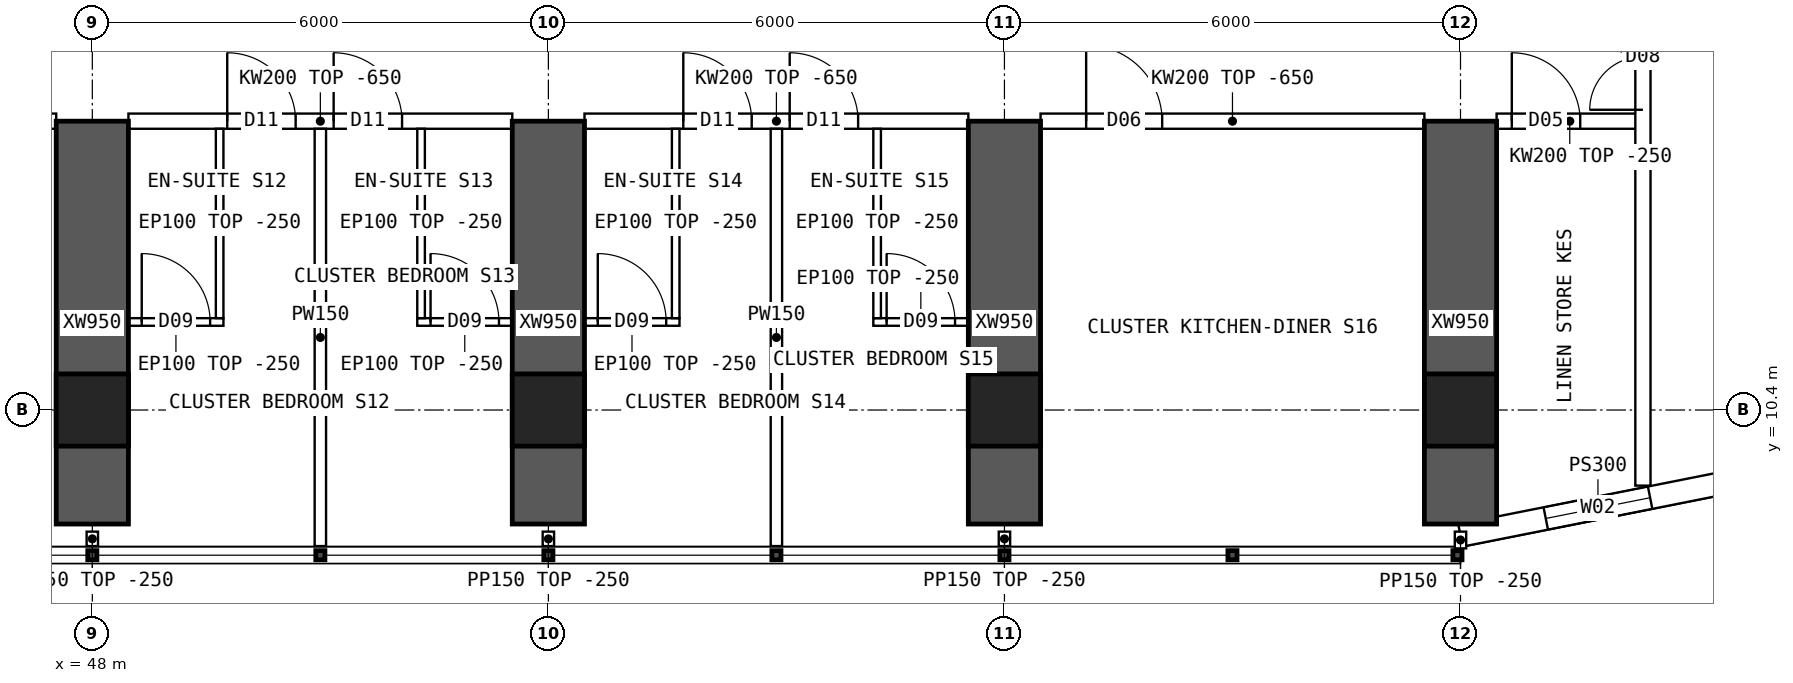
"""IFC4 building model, lengths in metres.
Left out: names, types, materials, properties, quantities, classifications, styles, units other than length and angle.
Written with IfcOpenShell. Run it as: python <this file> out.ifc"""

import sys

from ifc_helpers import new_model, si_unit, direction, frame, frame_2d, origin, origin_2d, place, context, subcontext, project, spatial, polyline, rectangle, hollow_rectangle, outline, extrude, element, fill, save


model = new_model("IFC4")
c1 = context("Model", 3, precision=1e-05, world=origin(), true_north=direction((0.0, 1.0)))
c2 = subcontext(c1, "Body", "Model", "MODEL_VIEW")
j1 = project(units=[si_unit("LENGTHUNIT", "METRE"), si_unit("PLANEANGLEUNIT", "RADIAN")], contexts=[c1])
p1 = place(None, origin())
s1 = spatial("IfcSite", under=j1, at=p1, CompositionType="ELEMENT")
p2 = place(p1, origin())
s2 = spatial("IfcBuilding", under=s1, at=p2, CompositionType="ELEMENT")
p3 = place(p2, frame((0.0, 0.0, 125.65)))
s3 = spatial("IfcBuildingStorey", under=s2, at=p3, CompositionType="ELEMENT", Elevation=125.65)
for number, where, z_axis, x_axis in (
    (1, (48.0, 10.4, 0.0), (0.0, 0.0, 1.0), (1.0, 0.0, 0.0)),
    (2, (54.0, 10.4, 0.0), (0.0, 0.0, 1.0), (1.0, 0.0, 0.0)),
    (3, (60.0, 10.4, 0.0), (0.0, 0.0, 1.0), (1.0, 0.0, 0.0)),
    (4, (66.0, 10.4, 0.0), (0.0, 0.0, 1.0), (1.0, 0.0, 0.0)),
):
    element("IfcColumn", number, at=place(p3, frame(where, z_axis=z_axis, x_axis=x_axis)), inside=s3, PredefinedType="COLUMN", context=c2, shape_type="SweptSolid", body=[
        extrude(hollow_rectangle(XDim=0.95, YDim=0.95, WallThickness=0.095, at=origin_2d()), origin(), (0.0, 0.0, 1.0), 3.75),
    ])
for number, where, z_axis, x_axis in (
    (5, (48.0, 8.9, 0.0), (0.0, 0.0, 1.0), (0.0, 1.0, 0.0)),
    (6, (54.0, 8.9, 0.0), (0.0, 0.0, 1.0), (0.0, 1.0, 0.0)),
    (7, (60.0, 8.9, 0.0), (0.0, 0.0, 1.0), (0.0, 1.0, 0.0)),
    (8, (66.0, 8.9, 0.0), (0.0, 0.0, 1.0), (0.0, 1.0, 0.0)),
):
    element("IfcWall", number, at=place(p3, frame(where, z_axis=z_axis, x_axis=x_axis)), inside=s3, PredefinedType="SHEAR", context=c2, shape_type="SweptSolid", body=[
        extrude(rectangle(XDim=5.3, YDim=0.95, at=frame_2d((2.65, 0.0))), origin(), (0.0, 0.0, 1.0), 3.75),
    ])
p4 = place(p3, frame((66.0, 8.75, 0.0), z_axis=(0.0, 0.0, 1.0), x_axis=(0.980791473772, 0.195059183267, 0.0)))
e9 = element("IfcWall", 9, at=p4, inside=s3, PredefinedType="SOLIDWALL", context=c2, shape_type="SweptSolid", body=[
    extrude(outline(polyline([(-0.03, -0.15), (3.717, -0.15), (3.657, 0.15), (0.03, 0.15), (-0.03, -0.15)])), origin(), (0.0, 0.0, 1.0), 3.5),
])
p5 = place(p4, frame((1.144, 0.0, 0.9)))
e10 = element("IfcOpeningElement", 10, at=p5, cuts=e9, PredefinedType="OPENING", context=c2, shape_type="SweptSolid", body=[
    extrude(rectangle(XDim=1.4, YDim=1.8, at=frame_2d((0.7, 0.9))), frame((0.0, 0.16, 0.0), z_axis=(0.0, -1.0, 0.0), x_axis=(1.0, 0.0, 0.0)), (0.0, 0.0, 1.0), 0.32),
])
p6 = place(p3, frame((42.475, 14.2, 0.0), z_axis=(0.0, 0.0, 1.0), x_axis=(1.0, 0.0, 0.0)))
e11 = element("IfcWall", 11, at=p6, inside=s3, PredefinedType="SOLIDWALL", context=c2, shape_type="SweptSolid", body=[
    extrude(outline(polyline([(0.0, 0.0), (5.05, 0.0), (5.05, 3.1), (0.0, 3.1), (0.0, 0.0)])), frame((0.0, 0.1, 0.0), z_axis=(0.0, -1.0, 0.0), x_axis=(1.0, 0.0, 0.0)), (0.0, 0.0, 1.0), 0.2),
])
p7 = place(p6, frame((0.6, 0.0, 0.0)))
e12 = element("IfcOpeningElement", 12, at=p7, cuts=e11, PredefinedType="OPENING", context=c2, shape_type="SweptSolid", body=[
    extrude(rectangle(XDim=1.0, YDim=2.1, at=frame_2d((0.5, 1.05))), frame((0.0, 0.11, 0.0), z_axis=(0.0, -1.0, 0.0), x_axis=(1.0, 0.0, 0.0)), (0.0, 0.0, 1.0), 0.22),
])
p8 = place(p3, frame((48.475, 14.2, 0.0), z_axis=(0.0, 0.0, 1.0), x_axis=(1.0, 0.0, 0.0)))
e13 = element("IfcWall", 13, at=p8, inside=s3, PredefinedType="SOLIDWALL", context=c2, shape_type="SweptSolid", body=[
    extrude(outline(polyline([(0.0, 0.0), (5.05, 0.0), (5.05, 3.1), (0.0, 3.1), (0.0, 0.0)])), frame((0.0, 0.1, 0.0), z_axis=(0.0, -1.0, 0.0), x_axis=(1.0, 0.0, 0.0)), (0.0, 0.0, 1.0), 0.2),
])
p9 = place(p8, frame((1.3, 0.0, 0.0)))
e14 = element("IfcOpeningElement", 14, at=p9, cuts=e13, PredefinedType="OPENING", context=c2, shape_type="SweptSolid", body=[
    extrude(rectangle(XDim=0.9, YDim=2.1, at=frame_2d((0.45, 1.05))), frame((0.0, 0.11, 0.0), z_axis=(0.0, -1.0, 0.0), x_axis=(1.0, 0.0, 0.0)), (0.0, 0.0, 1.0), 0.22),
])
p10 = place(p8, frame((2.7, 0.0, 0.0)))
e15 = element("IfcOpeningElement", 15, at=p10, cuts=e13, PredefinedType="OPENING", context=c2, shape_type="SweptSolid", body=[
    extrude(rectangle(XDim=0.9, YDim=2.1, at=frame_2d((0.45, 1.05))), frame((0.0, 0.11, 0.0), z_axis=(0.0, -1.0, 0.0), x_axis=(1.0, 0.0, 0.0)), (0.0, 0.0, 1.0), 0.22),
])
p11 = place(p3, frame((54.475, 14.2, 0.0), z_axis=(0.0, 0.0, 1.0), x_axis=(1.0, 0.0, 0.0)))
e16 = element("IfcWall", 16, at=p11, inside=s3, PredefinedType="SOLIDWALL", context=c2, shape_type="SweptSolid", body=[
    extrude(outline(polyline([(0.0, 0.0), (5.05, 0.0), (5.05, 3.1), (0.0, 3.1), (0.0, 0.0)])), frame((0.0, 0.1, 0.0), z_axis=(0.0, -1.0, 0.0), x_axis=(1.0, 0.0, 0.0)), (0.0, 0.0, 1.0), 0.2),
])
p12 = place(p11, frame((1.3, 0.0, 0.0)))
e17 = element("IfcOpeningElement", 17, at=p12, cuts=e16, PredefinedType="OPENING", context=c2, shape_type="SweptSolid", body=[
    extrude(rectangle(XDim=0.9, YDim=2.1, at=frame_2d((0.45, 1.05))), frame((0.0, 0.11, 0.0), z_axis=(0.0, -1.0, 0.0), x_axis=(1.0, 0.0, 0.0)), (0.0, 0.0, 1.0), 0.22),
])
p13 = place(p11, frame((2.7, 0.0, 0.0)))
e18 = element("IfcOpeningElement", 18, at=p13, cuts=e16, PredefinedType="OPENING", context=c2, shape_type="SweptSolid", body=[
    extrude(rectangle(XDim=0.9, YDim=2.1, at=frame_2d((0.45, 1.05))), frame((0.0, 0.11, 0.0), z_axis=(0.0, -1.0, 0.0), x_axis=(1.0, 0.0, 0.0)), (0.0, 0.0, 1.0), 0.22),
])
p14 = place(p3, frame((60.475, 14.2, 0.0), z_axis=(0.0, 0.0, 1.0), x_axis=(1.0, 0.0, 0.0)))
e19 = element("IfcWall", 19, at=p14, inside=s3, PredefinedType="SOLIDWALL", context=c2, shape_type="SweptSolid", body=[
    extrude(outline(polyline([(0.0, 0.0), (5.05, 0.0), (5.05, 3.1), (0.0, 3.1), (0.0, 0.0)])), frame((0.0, 0.1, 0.0), z_axis=(0.0, -1.0, 0.0), x_axis=(1.0, 0.0, 0.0)), (0.0, 0.0, 1.0), 0.2),
])
p15 = place(p14, frame((0.6, 0.0, 0.0)))
e20 = element("IfcOpeningElement", 20, at=p15, cuts=e19, PredefinedType="OPENING", context=c2, shape_type="SweptSolid", body=[
    extrude(rectangle(XDim=1.0, YDim=2.1, at=frame_2d((0.5, 1.05))), frame((0.0, 0.11, 0.0), z_axis=(0.0, -1.0, 0.0), x_axis=(1.0, 0.0, 0.0)), (0.0, 0.0, 1.0), 0.22),
])
p16 = place(p3, frame((66.475, 14.2, 0.0), z_axis=(0.0, 0.0, 1.0), x_axis=(1.0, 0.0, 0.0)))
e21 = element("IfcWall", 21, at=p16, inside=s3, PredefinedType="SOLIDWALL", context=c2, shape_type="SweptSolid", body=[
    extrude(rectangle(XDim=1.925, YDim=0.2, at=frame_2d((0.962, 0.0))), origin(), (0.0, 0.0, 1.0), 3.5),
])
p17 = place(p16, frame((0.2, 0.0, 0.0)))
e22 = element("IfcOpeningElement", 22, at=p17, cuts=e21, PredefinedType="OPENING", context=c2, shape_type="SweptSolid", body=[
    extrude(rectangle(XDim=0.9, YDim=2.1, at=frame_2d((0.45, 1.05))), frame((0.0, 0.11, 0.0), z_axis=(0.0, -1.0, 0.0), x_axis=(1.0, 0.0, 0.0)), (0.0, 0.0, 1.0), 0.22),
])
p18 = place(p3, frame((51.0, 8.61, 0.0), z_axis=(0.0, 0.0, 1.0), x_axis=(0.0, 1.0, 0.0)))
e23 = element("IfcWall", 23, at=p18, inside=s3, PredefinedType="PARTITIONING", context=c2, shape_type="SweptSolid", body=[
    extrude(outline(polyline([(0.0, 0.0), (5.49, 0.0), (5.49, 3.1), (5.442, 3.1), (5.44, 3.5), (1.992, 3.5), (1.99, 3.1), (1.592, 3.1), (1.59, 3.5), (0.0, 3.5), (0.0, 0.0)])), frame((0.0, 0.075, 0.0), z_axis=(0.0, -1.0, 0.0), x_axis=(1.0, 0.0, 0.0)), (0.0, 0.0, 1.0), 0.15),
])
p19 = place(p3, frame((49.725, 11.558, 0.0), z_axis=(0.0, 0.0, 1.0), x_axis=(-1.0, 0.0, 0.0)))
e24 = element("IfcWall", 24, at=p19, inside=s3, PredefinedType="PARTITIONING", context=c2, shape_type="SweptSolid", body=[
    extrude(rectangle(XDim=1.25, YDim=0.1, at=frame_2d((0.625, 0.0))), origin(), (0.0, 0.0, 1.0), 3.5),
])
p20 = place(p19, frame((0.175, 0.0, 0.0)))
e25 = element("IfcOpeningElement", 25, at=p20, cuts=e24, PredefinedType="OPENING", context=c2, shape_type="SweptSolid", body=[
    extrude(rectangle(XDim=0.9, YDim=2.1, at=frame_2d((0.45, 1.05))), frame((0.0, 0.06, 0.0), z_axis=(0.0, -1.0, 0.0), x_axis=(1.0, 0.0, 0.0)), (0.0, 0.0, 1.0), 0.12),
])
p21 = place(p3, frame((49.675, 11.608, 0.0), z_axis=(0.0, 0.0, 1.0), x_axis=(0.0, 1.0, 0.0)))
e26 = element("IfcWall", 26, at=p21, inside=s3, PredefinedType="PARTITIONING", context=c2, shape_type="SweptSolid", body=[
    extrude(outline(polyline([(0.0, 0.0), (2.492, 0.0), (2.492, 3.1), (2.444, 3.1), (2.442, 3.5), (0.0, 3.5), (0.0, 0.0)])), frame((0.0, 0.05, 0.0), z_axis=(0.0, -1.0, 0.0), x_axis=(1.0, 0.0, 0.0)), (0.0, 0.0, 1.0), 0.1),
])
p22 = place(p3, frame((53.525, 11.558, 0.0), z_axis=(0.0, 0.0, 1.0), x_axis=(-1.0, 0.0, 0.0)))
e27 = element("IfcWall", 27, at=p22, inside=s3, PredefinedType="PARTITIONING", context=c2, shape_type="SweptSolid", body=[
    extrude(rectangle(XDim=1.25, YDim=0.1, at=frame_2d((0.625, 0.0))), origin(), (0.0, 0.0, 1.0), 3.5),
])
p23 = place(p22, frame((0.175, 0.0, 0.0)))
e28 = element("IfcOpeningElement", 28, at=p23, cuts=e27, PredefinedType="OPENING", context=c2, shape_type="SweptSolid", body=[
    extrude(rectangle(XDim=0.9, YDim=2.1, at=frame_2d((0.45, 1.05))), frame((0.0, 0.06, 0.0), z_axis=(0.0, -1.0, 0.0), x_axis=(1.0, 0.0, 0.0)), (0.0, 0.0, 1.0), 0.12),
])
p24 = place(p3, frame((52.325, 11.608, 0.0), z_axis=(0.0, 0.0, 1.0), x_axis=(0.0, 1.0, 0.0)))
e29 = element("IfcWall", 29, at=p24, inside=s3, PredefinedType="PARTITIONING", context=c2, shape_type="SweptSolid", body=[
    extrude(outline(polyline([(0.0, 0.0), (2.492, 0.0), (2.492, 3.1), (2.444, 3.1), (2.442, 3.5), (0.0, 3.5), (0.0, 0.0)])), frame((0.0, 0.05, 0.0), z_axis=(0.0, -1.0, 0.0), x_axis=(1.0, 0.0, 0.0)), (0.0, 0.0, 1.0), 0.1),
])
p25 = place(p3, frame((57.0, 8.61, 0.0), z_axis=(0.0, 0.0, 1.0), x_axis=(0.0, 1.0, 0.0)))
e30 = element("IfcWall", 30, at=p25, inside=s3, PredefinedType="PARTITIONING", context=c2, shape_type="SweptSolid", body=[
    extrude(outline(polyline([(0.0, 0.0), (5.49, 0.0), (5.49, 3.1), (5.442, 3.1), (5.44, 3.5), (1.992, 3.5), (1.99, 3.1), (1.592, 3.1), (1.59, 3.5), (0.0, 3.5), (0.0, 0.0)])), frame((0.0, 0.075, 0.0), z_axis=(0.0, -1.0, 0.0), x_axis=(1.0, 0.0, 0.0)), (0.0, 0.0, 1.0), 0.15),
])
p26 = place(p3, frame((55.725, 11.558, 0.0), z_axis=(0.0, 0.0, 1.0), x_axis=(-1.0, 0.0, 0.0)))
e31 = element("IfcWall", 31, at=p26, inside=s3, PredefinedType="PARTITIONING", context=c2, shape_type="SweptSolid", body=[
    extrude(rectangle(XDim=1.25, YDim=0.1, at=frame_2d((0.625, 0.0))), origin(), (0.0, 0.0, 1.0), 3.5),
])
p27 = place(p26, frame((0.175, 0.0, 0.0)))
e32 = element("IfcOpeningElement", 32, at=p27, cuts=e31, PredefinedType="OPENING", context=c2, shape_type="SweptSolid", body=[
    extrude(rectangle(XDim=0.9, YDim=2.1, at=frame_2d((0.45, 1.05))), frame((0.0, 0.06, 0.0), z_axis=(0.0, -1.0, 0.0), x_axis=(1.0, 0.0, 0.0)), (0.0, 0.0, 1.0), 0.12),
])
p28 = place(p3, frame((55.675, 11.608, 0.0), z_axis=(0.0, 0.0, 1.0), x_axis=(0.0, 1.0, 0.0)))
e33 = element("IfcWall", 33, at=p28, inside=s3, PredefinedType="PARTITIONING", context=c2, shape_type="SweptSolid", body=[
    extrude(outline(polyline([(0.0, 0.0), (2.492, 0.0), (2.492, 3.1), (2.444, 3.1), (2.442, 3.5), (0.0, 3.5), (0.0, 0.0)])), frame((0.0, 0.05, 0.0), z_axis=(0.0, -1.0, 0.0), x_axis=(1.0, 0.0, 0.0)), (0.0, 0.0, 1.0), 0.1),
])
p29 = place(p3, frame((59.525, 11.558, 0.0), z_axis=(0.0, 0.0, 1.0), x_axis=(-1.0, 0.0, 0.0)))
e34 = element("IfcWall", 34, at=p29, inside=s3, PredefinedType="PARTITIONING", context=c2, shape_type="SweptSolid", body=[
    extrude(rectangle(XDim=1.25, YDim=0.1, at=frame_2d((0.625, 0.0))), origin(), (0.0, 0.0, 1.0), 3.5),
])
p30 = place(p29, frame((0.175, 0.0, 0.0)))
e35 = element("IfcOpeningElement", 35, at=p30, cuts=e34, PredefinedType="OPENING", context=c2, shape_type="SweptSolid", body=[
    extrude(rectangle(XDim=0.9, YDim=2.1, at=frame_2d((0.45, 1.05))), frame((0.0, 0.06, 0.0), z_axis=(0.0, -1.0, 0.0), x_axis=(1.0, 0.0, 0.0)), (0.0, 0.0, 1.0), 0.12),
])
p31 = place(p3, frame((58.325, 11.608, 0.0), z_axis=(0.0, 0.0, 1.0), x_axis=(0.0, 1.0, 0.0)))
e36 = element("IfcWall", 36, at=p31, inside=s3, PredefinedType="PARTITIONING", context=c2, shape_type="SweptSolid", body=[
    extrude(outline(polyline([(0.0, 0.0), (2.492, 0.0), (2.492, 3.1), (2.444, 3.1), (2.442, 3.5), (0.0, 3.5), (0.0, 0.0)])), frame((0.0, 0.05, 0.0), z_axis=(0.0, -1.0, 0.0), x_axis=(1.0, 0.0, 0.0)), (0.0, 0.0, 1.0), 0.1),
])
p32 = place(p3, frame((68.4, 9.405, 0.0), z_axis=(0.0, 0.0, 1.0), x_axis=(0.0, 1.0, 0.0)))
e37 = element("IfcWall", 37, at=p32, inside=s3, PredefinedType="SOLIDWALL", context=c2, shape_type="SweptSolid", body=[
    extrude(rectangle(XDim=45.189, YDim=0.2, at=frame_2d((22.595, 0.0))), origin(), (0.0, 0.0, 1.0), 3.5),
])
p33 = place(p32, frame((4.945, 0.0, 0.0)))
e38 = element("IfcOpeningElement", 38, at=p33, cuts=e37, PredefinedType="OPENING", context=c2, shape_type="SweptSolid", body=[
    extrude(rectangle(XDim=1.4, YDim=2.1, at=frame_2d((0.7, 1.05))), frame((0.0, 0.11, 0.0), z_axis=(0.0, -1.0, 0.0), x_axis=(1.0, 0.0, 0.0)), (0.0, 0.0, 1.0), 0.22),
])
p34 = place(p32, frame((38.745, 0.0, 0.0)))
e39 = element("IfcOpeningElement", 39, at=p34, cuts=e37, PredefinedType="OPENING", context=c2, shape_type="SweptSolid", body=[
    extrude(rectangle(XDim=1.4, YDim=2.1, at=frame_2d((0.7, 1.05))), frame((0.0, 0.11, 0.0), z_axis=(0.0, -1.0, 0.0), x_axis=(1.0, 0.0, 0.0)), (0.0, 0.0, 1.0), 0.22),
])
for number, where, z_axis, x_axis in (
    (40, (48.0, 8.8, 0.0), (0.0, 0.0, 1.0), (0.0, -1.0, 0.0)),
    (41, (54.0, 8.8, 0.0), (0.0, 0.0, 1.0), (0.0, -1.0, 0.0)),
    (42, (60.0, 8.8, 0.0), (0.0, 0.0, 1.0), (0.0, -1.0, 0.0)),
):
    element("IfcWall", number, at=place(p3, frame(where, z_axis=z_axis, x_axis=x_axis)), inside=s3, PredefinedType="PARTITIONING", context=c2, shape_type="SweptSolid", body=[
        extrude(rectangle(XDim=0.19, YDim=0.15, at=frame_2d((0.095, 0.0))), origin(), (0.0, 0.0, 1.0), 3.5),
    ])
p35 = place(p3, frame((66.0, 8.8, 0.0), z_axis=(0.0, 0.0, 1.0), x_axis=(0.0, -1.0, 0.0)))
e43 = element("IfcWall", 43, at=p35, inside=s3, PredefinedType="PARTITIONING", context=c2, shape_type="SweptSolid", body=[
    extrude(rectangle(XDim=0.22, YDim=0.15, at=frame_2d((0.11, 0.0))), origin(), (0.0, 0.0, 1.0), 3.5),
])
p36 = place(p5, origin())
e44 = element("IfcWindow", 44, at=p36, inside=s3, PartitioningType="SINGLE_PANEL", PredefinedType="WINDOW", context=c2, shape_type="SweptSolid", body=[
    extrude(rectangle(XDim=1.4, YDim=1.8, at=frame_2d((0.7, 0.9))), frame((0.0, 0.03, 0.0), z_axis=(0.0, -1.0, 0.0), x_axis=(1.0, 0.0, 0.0)), (0.0, 0.0, 1.0), 0.06),
])
fill(e10, e44)
p37 = place(p20, origin())
e45 = element("IfcDoor", 45, at=p37, inside=s3, OperationType="SINGLE_SWING_RIGHT", PredefinedType="DOOR", context=c2, shape_type="SweptSolid", body=[
    extrude(rectangle(XDim=0.9, YDim=2.1, at=frame_2d((0.45, 1.05))), frame((0.0, 0.025, 0.0), z_axis=(0.0, -1.0, 0.0), x_axis=(1.0, 0.0, 0.0)), (0.0, 0.0, 1.0), 0.05),
])
fill(e25, e45)
p38 = place(p9, origin())
e46 = element("IfcDoor", 46, at=p38, inside=s3, OperationType="SINGLE_SWING_LEFT", PredefinedType="DOOR", context=c2, shape_type="SweptSolid", body=[
    extrude(rectangle(XDim=0.9, YDim=2.1, at=frame_2d((0.45, 1.05))), frame((0.0, 0.025, 0.0), z_axis=(0.0, -1.0, 0.0), x_axis=(1.0, 0.0, 0.0)), (0.0, 0.0, 1.0), 0.05),
])
fill(e14, e46)
p39 = place(p23, origin())
e47 = element("IfcDoor", 47, at=p39, inside=s3, OperationType="SINGLE_SWING_RIGHT", PredefinedType="DOOR", context=c2, shape_type="SweptSolid", body=[
    extrude(rectangle(XDim=0.9, YDim=2.1, at=frame_2d((0.45, 1.05))), frame((0.0, 0.025, 0.0), z_axis=(0.0, -1.0, 0.0), x_axis=(1.0, 0.0, 0.0)), (0.0, 0.0, 1.0), 0.05),
])
fill(e28, e47)
p40 = place(p10, origin())
e48 = element("IfcDoor", 48, at=p40, inside=s3, OperationType="SINGLE_SWING_LEFT", PredefinedType="DOOR", context=c2, shape_type="SweptSolid", body=[
    extrude(rectangle(XDim=0.9, YDim=2.1, at=frame_2d((0.45, 1.05))), frame((0.0, 0.025, 0.0), z_axis=(0.0, -1.0, 0.0), x_axis=(1.0, 0.0, 0.0)), (0.0, 0.0, 1.0), 0.05),
])
fill(e15, e48)
p41 = place(p27, origin())
e49 = element("IfcDoor", 49, at=p41, inside=s3, OperationType="SINGLE_SWING_RIGHT", PredefinedType="DOOR", context=c2, shape_type="SweptSolid", body=[
    extrude(rectangle(XDim=0.9, YDim=2.1, at=frame_2d((0.45, 1.05))), frame((0.0, 0.025, 0.0), z_axis=(0.0, -1.0, 0.0), x_axis=(1.0, 0.0, 0.0)), (0.0, 0.0, 1.0), 0.05),
])
fill(e32, e49)
p42 = place(p12, origin())
e50 = element("IfcDoor", 50, at=p42, inside=s3, OperationType="SINGLE_SWING_LEFT", PredefinedType="DOOR", context=c2, shape_type="SweptSolid", body=[
    extrude(rectangle(XDim=0.9, YDim=2.1, at=frame_2d((0.45, 1.05))), frame((0.0, 0.025, 0.0), z_axis=(0.0, -1.0, 0.0), x_axis=(1.0, 0.0, 0.0)), (0.0, 0.0, 1.0), 0.05),
])
fill(e17, e50)
p43 = place(p30, origin())
e51 = element("IfcDoor", 51, at=p43, inside=s3, OperationType="SINGLE_SWING_RIGHT", PredefinedType="DOOR", context=c2, shape_type="SweptSolid", body=[
    extrude(rectangle(XDim=0.9, YDim=2.1, at=frame_2d((0.45, 1.05))), frame((0.0, 0.025, 0.0), z_axis=(0.0, -1.0, 0.0), x_axis=(1.0, 0.0, 0.0)), (0.0, 0.0, 1.0), 0.05),
])
fill(e35, e51)
p44 = place(p13, origin())
e52 = element("IfcDoor", 52, at=p44, inside=s3, OperationType="SINGLE_SWING_LEFT", PredefinedType="DOOR", context=c2, shape_type="SweptSolid", body=[
    extrude(rectangle(XDim=0.9, YDim=2.1, at=frame_2d((0.45, 1.05))), frame((0.0, 0.025, 0.0), z_axis=(0.0, -1.0, 0.0), x_axis=(1.0, 0.0, 0.0)), (0.0, 0.0, 1.0), 0.05),
])
fill(e18, e52)
p45 = place(p15, origin())
e53 = element("IfcDoor", 53, at=p45, inside=s3, OperationType="SINGLE_SWING_LEFT", PredefinedType="DOOR", context=c2, shape_type="SweptSolid", body=[
    extrude(rectangle(XDim=1.0, YDim=2.1, at=frame_2d((0.5, 1.05))), frame((0.0, 0.025, 0.0), z_axis=(0.0, -1.0, 0.0), x_axis=(1.0, 0.0, 0.0)), (0.0, 0.0, 1.0), 0.05),
])
fill(e20, e53)
p46 = place(p33, origin())
e54 = element("IfcDoor", 54, at=p46, inside=s3, OperationType="DOUBLE_DOOR_SINGLE_SWING", PredefinedType="DOOR", context=c2, shape_type="SweptSolid", body=[
    extrude(rectangle(XDim=1.4, YDim=2.1, at=frame_2d((0.7, 1.05))), frame((0.0, 0.025, 0.0), z_axis=(0.0, -1.0, 0.0), x_axis=(1.0, 0.0, 0.0)), (0.0, 0.0, 1.0), 0.05),
])
fill(e38, e54)
p47 = place(p17, origin())
e55 = element("IfcDoor", 55, at=p47, inside=s3, OperationType="SINGLE_SWING_LEFT", PredefinedType="DOOR", context=c2, shape_type="SweptSolid", body=[
    extrude(rectangle(XDim=0.9, YDim=2.1, at=frame_2d((0.45, 1.05))), frame((0.0, 0.025, 0.0), z_axis=(0.0, -1.0, 0.0), x_axis=(1.0, 0.0, 0.0)), (0.0, 0.0, 1.0), 0.05),
])
fill(e22, e55)
save(model, sys.argv[1])
